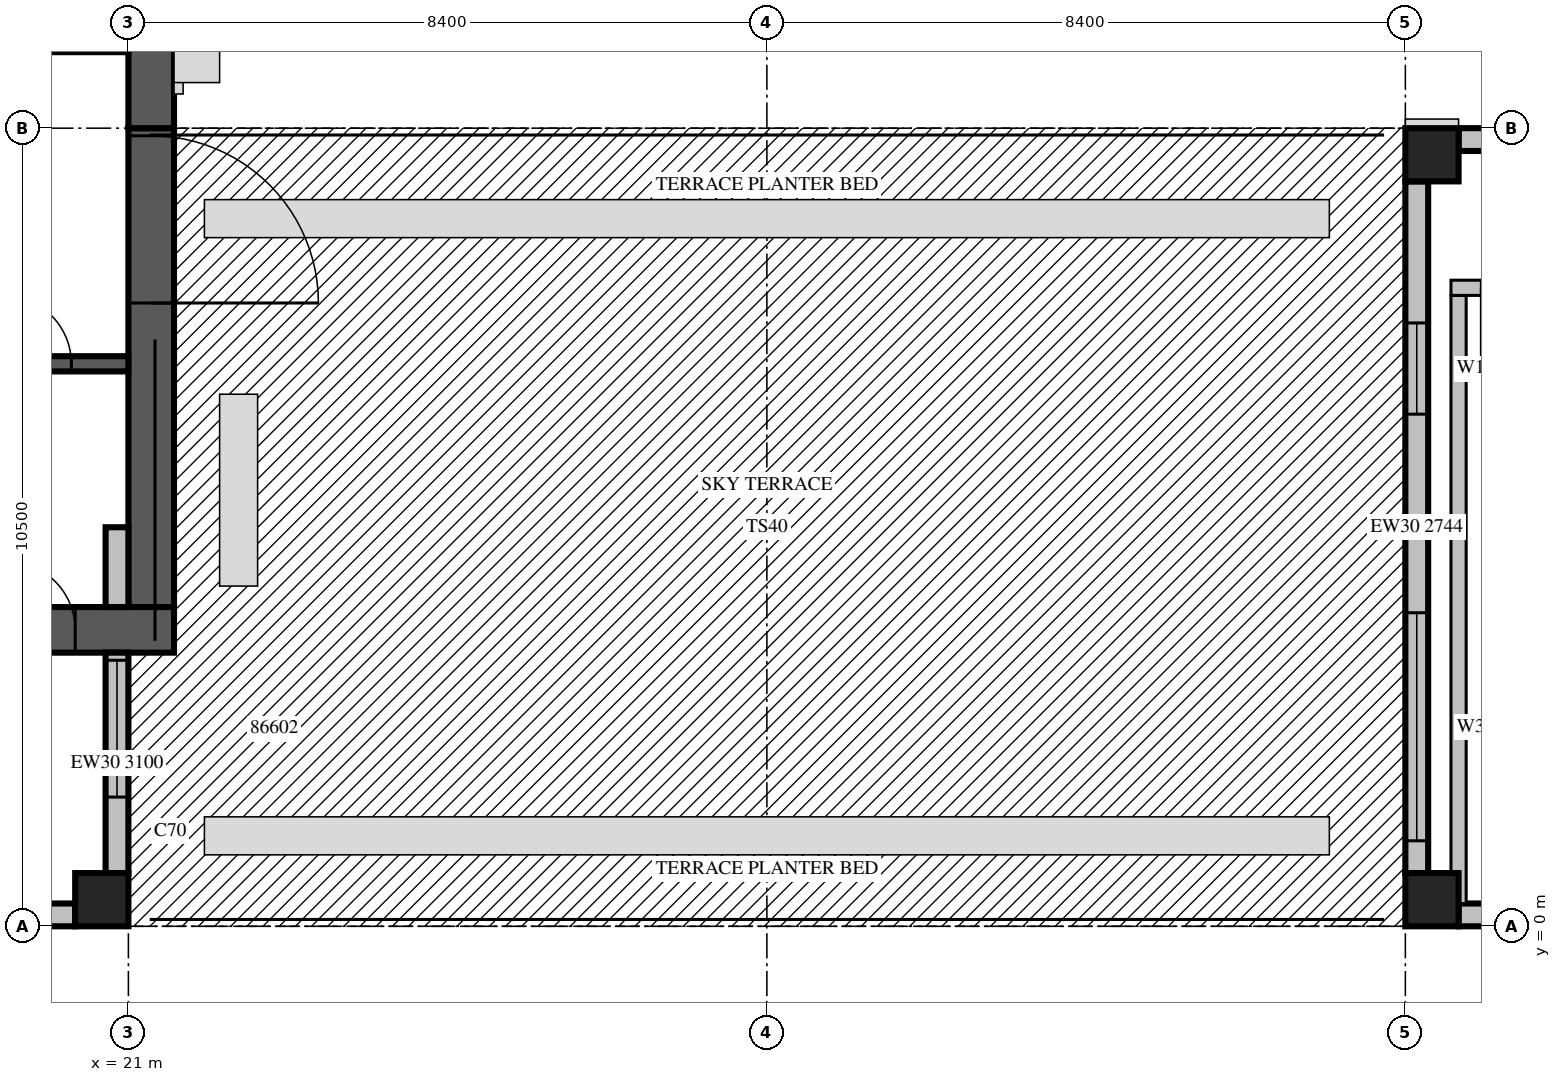
"""IFC4 building model, lengths in metres.
Left out: names, types, materials, properties, quantities, classifications, styles, units other than length and angle.
Written with IfcOpenShell. Run it as: python <this file> out.ifc"""

import sys

from ifc_helpers import new_model, si_unit, direction, frame, frame_2d, origin, origin_2d, place, context, subcontext, project, spatial, rectangle, extrude, source, transform, mapped, element, fill, save


model = new_model("IFC4")
c1 = context("Model", 3, precision=1e-05, world=origin(), true_north=direction((0.0, 1.0)))
c2 = subcontext(c1, "Body", "Model", "MODEL_VIEW")
j1 = project(units=[si_unit("LENGTHUNIT", "METRE"), si_unit("PLANEANGLEUNIT", "RADIAN")], contexts=[c1])
p1 = place(None, origin())
s1 = spatial("IfcSite", under=j1, at=p1, CompositionType="ELEMENT")
p2 = place(p1, origin())
s2 = spatial("IfcBuilding", under=s1, at=p2, CompositionType="ELEMENT")
p3 = place(p2, frame((0.0, 0.0, 291.5)))
s3 = spatial("IfcBuildingStorey", under=s2, at=p3, CompositionType="ELEMENT", Elevation=291.5)
m1 = source(origin(), c2, "Body", "SweptSolid", [
    extrude(rectangle(XDim=0.7, YDim=0.7, at=origin_2d()), origin(), (0.0, 0.0, 1.0), 3.5),
])
for number, where, z_axis, x_axis in (
    (1, (20.65, 0.35, 0.0), (0.0, 0.0, 1.0), (1.0, 0.0, 0.0)),
    (2, (38.15, 0.35, 0.0), (0.0, 0.0, 1.0), (1.0, 0.0, 0.0)),
    (3, (38.15, 10.15, 0.0), (0.0, 0.0, 1.0), (1.0, 0.0, 0.0)),
):
    element("IfcColumn", number, at=place(p3, frame(where, z_axis=z_axis, x_axis=x_axis)), inside=s3, PredefinedType="COLUMN", context=c2, shape_type="MappedRepresentation", body=[
        mapped(m1, transform((0.0, 0.0, 0.0), scale=1.0)),
    ])
m2 = source(origin(), c2, "Body", "SweptSolid", [
    extrude(rectangle(XDim=6.3, YDim=0.6, at=frame_2d((3.15, 0.0))), origin(), (0.0, 0.0, 1.0), 3.5),
])
p4 = place(p3, frame((21.3, 4.2, 0.0), z_axis=(0.0, 0.0, 1.0), x_axis=(0.0, 1.0, 0.0)))
e4 = element("IfcWall", 4, at=p4, inside=s3, PredefinedType="SHEAR", context=c2, shape_type="MappedRepresentation", body=[
    mapped(m2, transform((0.0, 0.0, 0.0), scale=1.0)),
])
m3 = source(origin(), c2, "Body", "SweptSolid", [
    extrude(rectangle(XDim=2.2, YDim=2.1, at=frame_2d((1.1, 1.05))), frame((0.0, 0.31, 0.0), z_axis=(0.0, -1.0, 0.0), x_axis=(1.0, 0.0, 0.0)), (0.0, 0.0, 1.0), 0.62),
])
p5 = place(p4, frame((4.0, 0.0, 0.0)))
e5 = element("IfcOpeningElement", 5, at=p5, cuts=e4, PredefinedType="OPENING", context=c2, shape_type="MappedRepresentation", body=[
    mapped(m3, transform((0.0, 0.0, 0.0), scale=1.0)),
])
m4 = source(origin(), c2, "Body", "SweptSolid", [
    extrude(rectangle(XDim=17.4, YDim=0.6, at=frame_2d((8.7, 0.0))), origin(), (0.0, 0.0, 1.0), 3.5),
])
p6 = place(p3, frame((4.2, 3.9, 0.0), z_axis=(0.0, 0.0, 1.0), x_axis=(1.0, 0.0, 0.0)))
e6 = element("IfcWall", 6, at=p6, inside=s3, PredefinedType="SHEAR", context=c2, shape_type="MappedRepresentation", body=[
    mapped(m4, transform((0.0, 0.0, 0.0), scale=1.0)),
])
m5 = source(origin(), c2, "Body", "SweptSolid", [
    extrude(rectangle(XDim=0.9, YDim=2.1, at=frame_2d((0.45, 1.05))), frame((0.0, 0.31, 0.0), z_axis=(0.0, -1.0, 0.0), x_axis=(1.0, 0.0, 0.0)), (0.0, 0.0, 1.0), 0.62),
])
p7 = place(p6, frame((15.2, 0.0, 0.0)))
e7 = element("IfcOpeningElement", 7, at=p7, cuts=e6, PredefinedType="OPENING", context=c2, shape_type="MappedRepresentation", body=[
    mapped(m5, transform((0.0, 0.0, 0.0), scale=1.0)),
])
m6 = source(origin(), c2, "Body", "SweptSolid", [
    extrude(rectangle(XDim=10.5, YDim=0.6, at=frame_2d((5.25, 0.0))), origin(), (0.0, 0.0, 1.0), 3.5),
])
p8 = place(p3, frame((21.3, 10.5, 0.0), z_axis=(0.0, 0.0, 1.0), x_axis=(0.0, 1.0, 0.0)))
e8 = element("IfcWall", 8, at=p8, inside=s3, PredefinedType="SHEAR", context=c2, shape_type="MappedRepresentation", body=[
    mapped(m6, transform((0.0, 0.0, 0.0), scale=1.0)),
])
m7 = source(origin(), c2, "Body", "SweptSolid", [
    extrude(rectangle(XDim=1.2, YDim=2.4, at=frame_2d((0.6, 1.2))), frame((0.0, 0.31, 0.0), z_axis=(0.0, -1.0, 0.0), x_axis=(1.0, 0.0, 0.0)), (0.0, 0.0, 1.0), 0.62),
])
p9 = place(p8, frame((5.7, 0.0, 0.6)))
e9 = element("IfcOpeningElement", 9, at=p9, cuts=e8, PredefinedType="OPENING", context=c2, shape_type="MappedRepresentation", body=[
    mapped(m7, transform((0.0, 0.0, 0.0), scale=1.0)),
])
m8 = source(origin(), c2, "Body", "SweptSolid", [
    extrude(rectangle(XDim=9.45, YDim=0.3, at=frame_2d((4.725, 0.0))), origin(), (0.0, 0.0, 1.0), 3.1),
])
p10 = place(p3, frame((10.85, 0.15, 0.0), z_axis=(0.0, 0.0, 1.0), x_axis=(1.0, 0.0, 0.0)))
e10 = element("IfcWall", 10, at=p10, inside=s3, PredefinedType="STANDARD", context=c2, shape_type="MappedRepresentation", body=[
    mapped(m8, transform((0.0, 0.0, 0.0), scale=1.0)),
])
m9 = source(origin(), c2, "Body", "SweptSolid", [
    extrude(rectangle(XDim=3.6, YDim=2.0, at=frame_2d((1.8, 1.0))), frame((0.0, 0.16, 0.0), z_axis=(0.0, -1.0, 0.0), x_axis=(1.0, 0.0, 0.0)), (0.0, 0.0, 1.0), 0.32),
])
p11 = place(p10, frame((0.475, 0.0, 0.6)))
e11 = element("IfcOpeningElement", 11, at=p11, cuts=e10, PredefinedType="OPENING", context=c2, shape_type="MappedRepresentation", body=[
    mapped(m9, transform((0.0, 0.0, 0.0), scale=1.0)),
])
m10 = source(origin(), c2, "Body", "SweptSolid", [
    extrude(rectangle(XDim=3.0, YDim=2.0, at=frame_2d((1.5, 1.0))), frame((0.0, 0.16, 0.0), z_axis=(0.0, -1.0, 0.0), x_axis=(1.0, 0.0, 0.0)), (0.0, 0.0, 1.0), 0.32),
])
p12 = place(p10, frame((6.025, 0.0, 0.6)))
e12 = element("IfcOpeningElement", 12, at=p12, cuts=e10, PredefinedType="OPENING", context=c2, shape_type="MappedRepresentation", body=[
    mapped(m10, transform((0.0, 0.0, 0.0), scale=1.0)),
])
m11 = source(origin(), c2, "Body", "SweptSolid", [
    extrude(rectangle(XDim=2.9, YDim=0.3, at=frame_2d((1.45, 0.0))), origin(), (0.0, 0.0, 1.0), 3.1),
])
p13 = place(p3, frame((20.85, 0.7, 0.0), z_axis=(0.0, 0.0, 1.0), x_axis=(0.0, 1.0, 0.0)))
e13 = element("IfcWall", 13, at=p13, inside=s3, PredefinedType="STANDARD", context=c2, shape_type="MappedRepresentation", body=[
    mapped(m11, transform((0.0, 0.0, 0.0), scale=1.0)),
])
m12 = source(origin(), c2, "Body", "SweptSolid", [
    extrude(rectangle(XDim=1.8, YDim=2.4, at=frame_2d((0.9, 1.2))), frame((0.0, 0.16, 0.0), z_axis=(0.0, -1.0, 0.0), x_axis=(1.0, 0.0, 0.0)), (0.0, 0.0, 1.0), 0.32),
])
p14 = place(p13, frame((1.0, 0.0, 0.0)))
e14 = element("IfcOpeningElement", 14, at=p14, cuts=e13, PredefinedType="OPENING", context=c2, shape_type="MappedRepresentation", body=[
    mapped(m12, transform((0.0, 0.0, 0.0), scale=1.0)),
])
p15 = place(p3, frame((20.85, 4.2, 0.0), z_axis=(0.0, 0.0, 1.0), x_axis=(0.0, 1.0, 0.0)))
e15 = element("IfcWall", 15, at=p15, inside=s3, PredefinedType="STANDARD", context=c2, shape_type="SweptSolid", body=[
    extrude(rectangle(XDim=1.05, YDim=0.3, at=frame_2d((0.525, 0.0))), origin(), (0.0, 0.0, 1.0), 3.1),
])
p16 = place(p3, frame((38.5, 0.15, 0.0), z_axis=(0.0, 0.0, 1.0), x_axis=(1.0, 0.0, 0.0)))
e16 = element("IfcWall", 16, at=p16, inside=s3, PredefinedType="STANDARD", context=c2, shape_type="SweptSolid", body=[
    extrude(rectangle(XDim=1.7, YDim=0.3, at=frame_2d((0.85, 0.0))), origin(), (0.0, 0.0, 1.0), 3.1),
])
p17 = place(p16, frame((0.4, 0.0, 0.6)))
e17 = element("IfcOpeningElement", 17, at=p17, cuts=e16, PredefinedType="OPENING", context=c2, shape_type="SweptSolid", body=[
    extrude(rectangle(XDim=0.9, YDim=2.0, at=frame_2d((0.45, 1.0))), frame((0.0, 0.16, 0.0), z_axis=(0.0, -1.0, 0.0), x_axis=(1.0, 0.0, 0.0)), (0.0, 0.0, 1.0), 0.32),
])
p18 = place(p3, frame((45.85, 10.35, 0.0), z_axis=(0.0, 0.0, 1.0), x_axis=(-1.0, 0.0, 0.0)))
e18 = element("IfcWall", 18, at=p18, inside=s3, PredefinedType="STANDARD", context=c2, shape_type="SweptSolid", body=[
    extrude(rectangle(XDim=7.35, YDim=0.3, at=frame_2d((3.675, 0.0))), origin(), (0.0, 0.0, 1.0), 3.1),
])
p19 = place(p18, frame((1.09, 0.0, 0.6)))
e19 = element("IfcOpeningElement", 19, at=p19, cuts=e18, PredefinedType="OPENING", context=c2, shape_type="MappedRepresentation", body=[
    mapped(m10, transform((0.0, 0.0, 0.0), scale=1.0)),
])
m13 = source(origin(), c2, "Body", "SweptSolid", [
    extrude(rectangle(XDim=1.2, YDim=2.0, at=frame_2d((0.6, 1.0))), frame((0.0, 0.16, 0.0), z_axis=(0.0, -1.0, 0.0), x_axis=(1.0, 0.0, 0.0)), (0.0, 0.0, 1.0), 0.32),
])
p20 = place(p18, frame((5.77, 0.0, 0.6)))
e20 = element("IfcOpeningElement", 20, at=p20, cuts=e18, PredefinedType="OPENING", context=c2, shape_type="MappedRepresentation", body=[
    mapped(m13, transform((0.0, 0.0, 0.0), scale=1.0)),
])
p21 = place(p3, frame((37.95, 9.8, 0.0), z_axis=(0.0, 0.0, 1.0), x_axis=(0.0, -1.0, 0.0)))
e21 = element("IfcWall", 21, at=p21, inside=s3, PredefinedType="STANDARD", context=c2, shape_type="SweptSolid", body=[
    extrude(rectangle(XDim=9.1, YDim=0.3, at=frame_2d((4.55, 0.0))), origin(), (0.0, 0.0, 1.0), 2.744),
])
p22 = place(p21, frame((1.863, 0.0, 0.6)))
e22 = element("IfcOpeningElement", 22, at=p22, cuts=e21, PredefinedType="OPENING", context=c2, shape_type="MappedRepresentation", body=[
    mapped(m13, transform((0.0, 0.0, 0.0), scale=1.0)),
])
p23 = place(p21, frame((5.675, 0.0, 0.6)))
e23 = element("IfcOpeningElement", 23, at=p23, cuts=e21, PredefinedType="OPENING", context=c2, shape_type="MappedRepresentation", body=[
    mapped(m10, transform((0.0, 0.0, 0.0), scale=1.0)),
])
m14 = source(origin(), c2, "Body", "SweptSolid", [
    extrude(rectangle(XDim=7.2, YDim=0.2, at=frame_2d((3.6, 0.0))), origin(), (0.0, 0.0, 1.0), 3.1),
])
p24 = place(p3, frame((13.8, 7.4, 0.0), z_axis=(0.0, 0.0, 1.0), x_axis=(1.0, 0.0, 0.0)))
e24 = element("IfcWall", 24, at=p24, inside=s3, PredefinedType="SOLIDWALL", context=c2, shape_type="MappedRepresentation", body=[
    mapped(m14, transform((0.0, 0.0, 0.0), scale=1.0)),
])
m15 = source(origin(), c2, "Body", "SweptSolid", [
    extrude(rectangle(XDim=0.9, YDim=2.1, at=frame_2d((0.45, 1.05))), frame((0.0, 0.11, 0.0), z_axis=(0.0, -1.0, 0.0), x_axis=(1.0, 0.0, 0.0)), (0.0, 0.0, 1.0), 0.22),
])
p25 = place(p24, frame((1.95, 0.0, 0.0)))
e25 = element("IfcOpeningElement", 25, at=p25, cuts=e24, PredefinedType="OPENING", context=c2, shape_type="MappedRepresentation", body=[
    mapped(m15, transform((0.0, 0.0, 0.0), scale=1.0)),
])
p26 = place(p24, frame((5.55, 0.0, 0.0)))
e26 = element("IfcOpeningElement", 26, at=p26, cuts=e24, PredefinedType="OPENING", context=c2, shape_type="MappedRepresentation", body=[
    mapped(m15, transform((0.0, 0.0, 0.0), scale=1.0)),
])
m16 = source(origin(), c2, "Body", "SweptSolid", [
    extrude(rectangle(XDim=8.0, YDim=0.2, at=frame_2d((4.0, 0.0))), origin(), (0.0, 0.0, 1.0), 3.1),
])
p27 = place(p3, frame((38.5, 0.3, 0.0), z_axis=(0.0, 0.0, 1.0), x_axis=(0.0, 1.0, 0.0)))
e27 = element("IfcWall", 27, at=p27, inside=s3, PredefinedType="PARTITIONING", context=c2, shape_type="MappedRepresentation", body=[
    mapped(m16, transform((0.0, 0.0, 0.0), scale=1.0)),
])
m17 = source(origin(), c2, "Body", "SweptSolid", [
    extrude(rectangle(XDim=5.45, YDim=0.2, at=frame_2d((2.725, 0.0))), origin(), (0.0, 0.0, 1.0), 3.1),
])
p28 = place(p3, frame((38.4, 8.4, 0.0), z_axis=(0.0, 0.0, 1.0), x_axis=(1.0, 0.0, 0.0)))
e28 = element("IfcWall", 28, at=p28, inside=s3, PredefinedType="PARTITIONING", context=c2, shape_type="MappedRepresentation", body=[
    mapped(m17, transform((0.0, 0.0, 0.0), scale=1.0)),
])
m18 = source(origin(), c2, "Body", "SweptSolid", [
    extrude(rectangle(XDim=1.2, YDim=2.1, at=frame_2d((0.6, 1.05))), frame((0.0, 0.11, 0.0), z_axis=(0.0, -1.0, 0.0), x_axis=(1.0, 0.0, 0.0)), (0.0, 0.0, 1.0), 0.22),
])
p29 = place(p28, frame((0.4, 0.0, 0.0)))
e29 = element("IfcOpeningElement", 29, at=p29, cuts=e28, PredefinedType="OPENING", context=c2, shape_type="MappedRepresentation", body=[
    mapped(m18, transform((0.0, 0.0, 0.0), scale=1.0)),
])
p30 = place(p28, frame((3.25, 0.0, 0.0)))
e30 = element("IfcOpeningElement", 30, at=p30, cuts=e28, PredefinedType="OPENING", context=c2, shape_type="MappedRepresentation", body=[
    mapped(m15, transform((0.0, 0.0, 0.0), scale=1.0)),
])
m19 = source(origin(), c2, "Body", "SweptSolid", [
    extrude(rectangle(XDim=1.8, YDim=2.4, at=frame_2d((0.9, 1.2))), frame((0.0, 0.025, 0.0), z_axis=(0.0, -1.0, 0.0), x_axis=(1.0, 0.0, 0.0)), (0.0, 0.0, 1.0), 0.05),
])
p31 = place(p14, origin())
e31 = element("IfcDoor", 31, at=p31, inside=s3, OperationType="SLIDING_TO_LEFT", PredefinedType="DOOR", context=c2, shape_type="MappedRepresentation", body=[
    mapped(m19, transform((0.0, 0.0, 0.0), scale=1.0)),
])
fill(e14, e31)
m20 = source(origin(), c2, "Body", "SweptSolid", [
    extrude(rectangle(XDim=1.2, YDim=2.0, at=frame_2d((0.6, 1.0))), frame((0.0, 0.03, 0.0), z_axis=(0.0, -1.0, 0.0), x_axis=(1.0, 0.0, 0.0)), (0.0, 0.0, 1.0), 0.06),
])
p32 = place(p22, origin())
e32 = element("IfcWindow", 32, at=p32, inside=s3, PartitioningType="SINGLE_PANEL", PredefinedType="WINDOW", context=c2, shape_type="MappedRepresentation", body=[
    mapped(m20, transform((0.0, 0.0, 0.0), scale=1.0)),
])
fill(e22, e32)
m21 = source(origin(), c2, "Body", "SweptSolid", [
    extrude(rectangle(XDim=3.0, YDim=2.0, at=frame_2d((1.5, 1.0))), frame((0.0, 0.03, 0.0), z_axis=(0.0, -1.0, 0.0), x_axis=(1.0, 0.0, 0.0)), (0.0, 0.0, 1.0), 0.06),
])
p33 = place(p23, origin())
e33 = element("IfcWindow", 33, at=p33, inside=s3, PartitioningType="SINGLE_PANEL", PredefinedType="WINDOW", context=c2, shape_type="MappedRepresentation", body=[
    mapped(m21, transform((0.0, 0.0, 0.0), scale=1.0)),
])
fill(e23, e33)
m22 = source(origin(), c2, "Body", "SweptSolid", [
    extrude(rectangle(XDim=0.9, YDim=2.1, at=frame_2d((0.45, 1.05))), frame((0.0, 0.025, 0.0), z_axis=(0.0, -1.0, 0.0), x_axis=(1.0, 0.0, 0.0)), (0.0, 0.0, 1.0), 0.05),
])
p34 = place(p26, origin())
e34 = element("IfcDoor", 34, at=p34, inside=s3, OperationType="SINGLE_SWING_LEFT", PredefinedType="DOOR", context=c2, shape_type="MappedRepresentation", body=[
    mapped(m22, transform((0.0, 0.0, 0.0), scale=1.0)),
])
fill(e26, e34)
m23 = source(origin(), c2, "Body", "SweptSolid", [
    extrude(rectangle(XDim=2.2, YDim=2.1, at=frame_2d((1.1, 1.05))), frame((0.0, 0.025, 0.0), z_axis=(0.0, -1.0, 0.0), x_axis=(1.0, 0.0, 0.0)), (0.0, 0.0, 1.0), 0.05),
])
p35 = place(p5, origin())
e35 = element("IfcDoor", 35, at=p35, inside=s3, OperationType="DOUBLE_DOOR_SINGLE_SWING", PredefinedType="DOOR", context=c2, shape_type="MappedRepresentation", body=[
    mapped(m23, transform((0.0, 0.0, 0.0), scale=1.0)),
])
fill(e5, e35)
p36 = place(p7, origin())
e36 = element("IfcDoor", 36, at=p36, inside=s3, OperationType="SINGLE_SWING_LEFT", PredefinedType="DOOR", context=c2, shape_type="MappedRepresentation", body=[
    mapped(m22, transform((0.0, 0.0, 0.0), scale=1.0)),
])
fill(e7, e36)
save(model, sys.argv[1])
